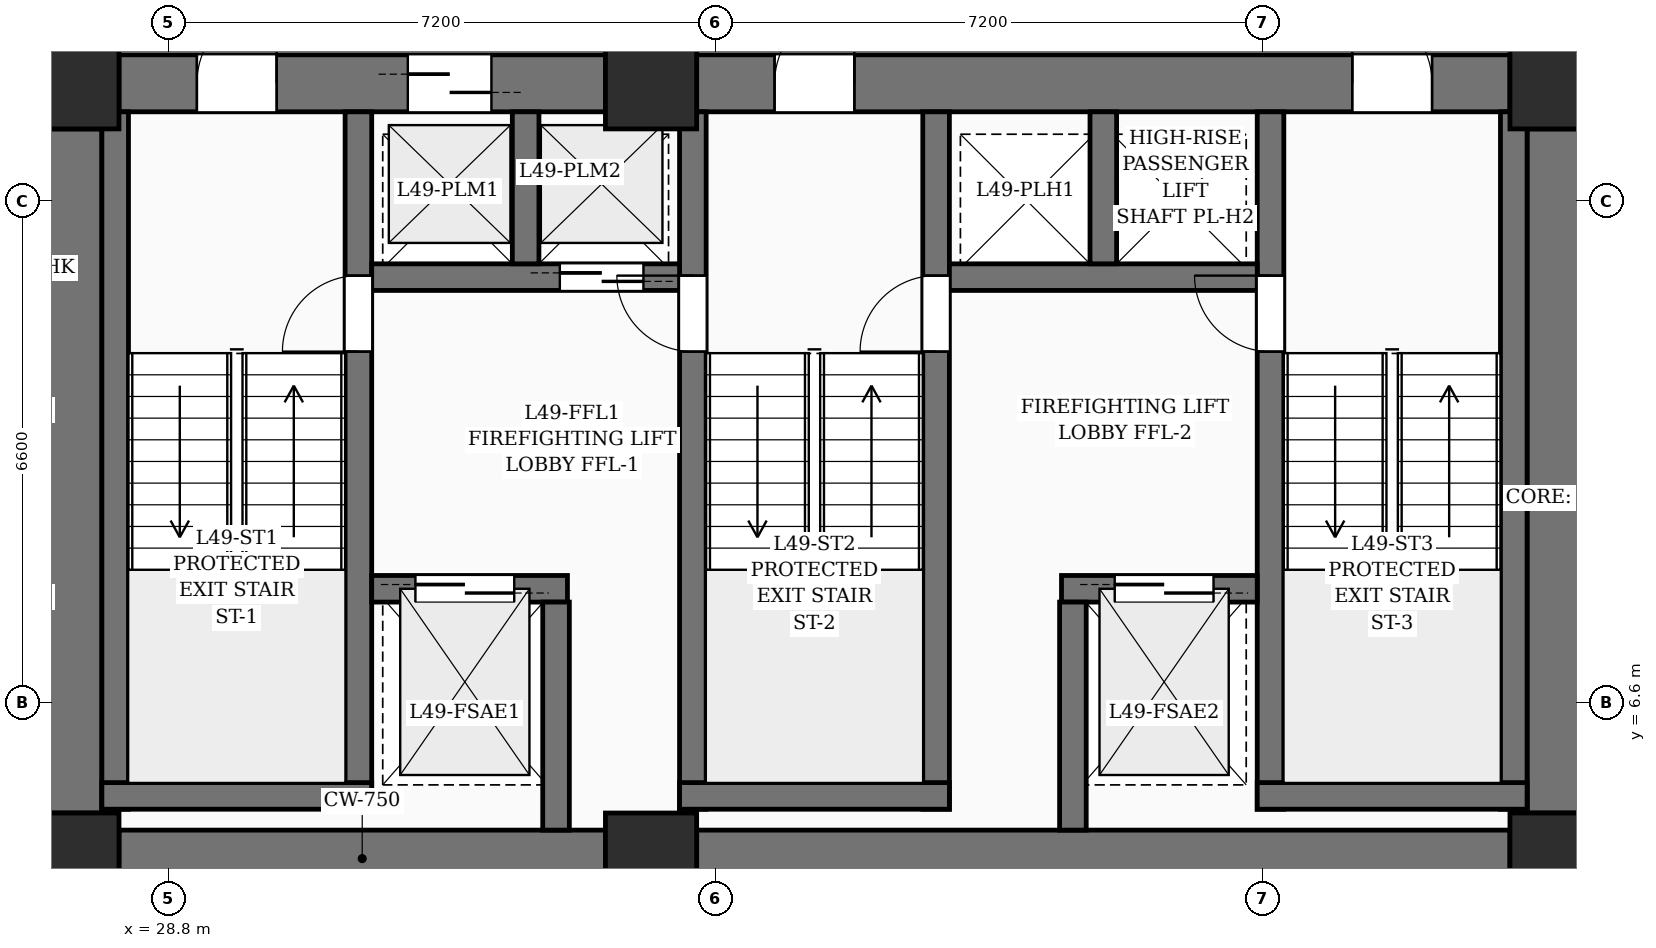
"""IFC4 building model, lengths in metres.
Left out: names, types, materials, properties, quantities, classifications, styles, units other than length and angle.
Written with IfcOpenShell. Run it as: python <this file> out.ifc"""

import sys

from ifc_helpers import new_model, si_unit, direction, frame, frame_2d, origin, origin_2d, place, context, subcontext, project, spatial, rectangle, extrude, element, fill, save


model = new_model("IFC4")
c1 = context("Model", 3, precision=1e-05, world=origin(), true_north=direction((0.0, 1.0)))
c2 = subcontext(c1, "Body", "Model", "MODEL_VIEW")
j1 = project(units=[si_unit("LENGTHUNIT", "METRE"), si_unit("PLANEANGLEUNIT", "RADIAN")], contexts=[c1])
p1 = place(None, origin())
s1 = spatial("IfcSite", under=j1, at=p1, CompositionType="ELEMENT")
p2 = place(p1, origin())
s2 = spatial("IfcBuilding", under=s1, at=p2, CompositionType="ELEMENT")
p3 = place(p2, frame((0.0, 0.0, 189.6)))
s3 = spatial("IfcBuildingStorey", under=s2, at=p3, CompositionType="ELEMENT", Elevation=189.6)
for number, where, z_axis, x_axis in (
    (1, (27.55, 4.55, 0.0), (0.0, 0.0, 1.0), (1.0, 0.0, 0.0)),
    (2, (35.15, 4.55, 0.0), (0.0, 0.0, 1.0), (1.0, 0.0, 0.0)),
    (3, (47.05, 4.55, 0.0), (0.0, 0.0, 1.0), (1.0, 0.0, 0.0)),
    (4, (27.55, 14.75, 0.0), (0.0, 0.0, 1.0), (1.0, 0.0, 0.0)),
    (5, (35.15, 14.75, 0.0), (0.0, 0.0, 1.0), (1.0, 0.0, 0.0)),
    (6, (47.05, 14.75, 0.0), (0.0, 0.0, 1.0), (1.0, 0.0, 0.0)),
):
    element("IfcColumn", number, at=place(p3, frame(where, z_axis=z_axis, x_axis=x_axis)), inside=s3, PredefinedType="COLUMN", context=c2, shape_type="SweptSolid", body=[
        extrude(rectangle(XDim=1.2, YDim=1.2, at=origin_2d()), origin(), (0.0, 0.0, 1.0), 3.6),
    ])
p4 = place(p3, frame((28.15, 4.55, 0.0), z_axis=(0.0, 0.0, 1.0), x_axis=(1.0, 0.0, 0.0)))
e7 = element("IfcWall", 7, at=p4, inside=s3, PredefinedType="SHEAR", context=c2, shape_type="SweptSolid", body=[
    extrude(rectangle(XDim=6.4, YDim=0.75, at=frame_2d((3.2, 0.0))), origin(), (0.0, 0.0, 1.0), 3.6),
])
p5 = place(p3, frame((35.75, 4.55, 0.0), z_axis=(0.0, 0.0, 1.0), x_axis=(1.0, 0.0, 0.0)))
e8 = element("IfcWall", 8, at=p5, inside=s3, PredefinedType="SHEAR", context=c2, shape_type="SweptSolid", body=[
    extrude(rectangle(XDim=10.7, YDim=0.75, at=frame_2d((5.35, 0.0))), origin(), (0.0, 0.0, 1.0), 3.6),
])
p6 = place(p3, frame((28.15, 14.75, 0.0), z_axis=(0.0, 0.0, 1.0), x_axis=(1.0, 0.0, 0.0)))
e9 = element("IfcWall", 9, at=p6, inside=s3, PredefinedType="SHEAR", context=c2, shape_type="SweptSolid", body=[
    extrude(rectangle(XDim=6.4, YDim=0.75, at=frame_2d((3.2, 0.0))), origin(), (0.0, 0.0, 1.0), 3.6),
])
p7 = place(p6, frame((1.025, 0.0, 0.0)))
e10 = element("IfcOpeningElement", 10, at=p7, cuts=e9, PredefinedType="OPENING", context=c2, shape_type="SweptSolid", body=[
    extrude(rectangle(XDim=1.05, YDim=2.15, at=frame_2d((0.525, 1.075))), frame((0.0, 0.385, 0.0), z_axis=(0.0, -1.0, 0.0), x_axis=(1.0, 0.0, 0.0)), (0.0, 0.0, 1.0), 0.77),
])
p8 = place(p6, frame((3.8, 0.0, 0.0)))
e11 = element("IfcOpeningElement", 11, at=p8, cuts=e9, PredefinedType="OPENING", context=c2, shape_type="SweptSolid", body=[
    extrude(rectangle(XDim=1.1, YDim=2.2, at=frame_2d((0.55, 1.1))), frame((0.0, 0.385, 0.0), z_axis=(0.0, -1.0, 0.0), x_axis=(1.0, 0.0, 0.0)), (0.0, 0.0, 1.0), 0.77),
])
p9 = place(p3, frame((35.75, 14.75, 0.0), z_axis=(0.0, 0.0, 1.0), x_axis=(1.0, 0.0, 0.0)))
e12 = element("IfcWall", 12, at=p9, inside=s3, PredefinedType="SHEAR", context=c2, shape_type="SweptSolid", body=[
    extrude(rectangle(XDim=10.7, YDim=0.75, at=frame_2d((5.35, 0.0))), origin(), (0.0, 0.0, 1.0), 3.6),
])
p10 = place(p9, frame((1.025, 0.0, 0.0)))
e13 = element("IfcOpeningElement", 13, at=p10, cuts=e12, PredefinedType="OPENING", context=c2, shape_type="SweptSolid", body=[
    extrude(rectangle(XDim=1.05, YDim=2.15, at=frame_2d((0.525, 1.075))), frame((0.0, 0.385, 0.0), z_axis=(0.0, -1.0, 0.0), x_axis=(1.0, 0.0, 0.0)), (0.0, 0.0, 1.0), 0.77),
])
p11 = place(p9, frame((8.625, 0.0, 0.0)))
e14 = element("IfcOpeningElement", 14, at=p11, cuts=e12, PredefinedType="OPENING", context=c2, shape_type="SweptSolid", body=[
    extrude(rectangle(XDim=1.05, YDim=2.15, at=frame_2d((0.525, 1.075))), frame((0.0, 0.385, 0.0), z_axis=(0.0, -1.0, 0.0), x_axis=(1.0, 0.0, 0.0)), (0.0, 0.0, 1.0), 0.77),
])
for number, where, z_axis, x_axis in (
    (15, (27.55, 5.15, 0.0), (0.0, 0.0, 1.0), (0.0, 1.0, 0.0)),
    (16, (47.05, 5.15, 0.0), (0.0, 0.0, 1.0), (0.0, 1.0, 0.0)),
):
    element("IfcWall", number, at=place(p3, frame(where, z_axis=z_axis, x_axis=x_axis)), inside=s3, PredefinedType="SHEAR", context=c2, shape_type="SweptSolid", body=[
        extrude(rectangle(XDim=9.0, YDim=0.75, at=frame_2d((4.5, 0.0))), origin(), (0.0, 0.0, 1.0), 3.6),
    ])
p12 = place(p3, frame((28.1, 5.2, 0.0), z_axis=(0.0, 0.0, 1.0), x_axis=(0.0, 1.0, 0.0)))
e17 = element("IfcWall", 17, at=p12, inside=s3, PredefinedType="SOLIDWALL", context=c2, shape_type="SweptSolid", body=[
    extrude(rectangle(XDim=9.175, YDim=0.35, at=frame_2d((4.587, 0.0))), origin(), (0.0, 0.0, 1.0), 3.6),
])
p13 = place(p3, frame((31.3, 5.2, 0.0), z_axis=(0.0, 0.0, 1.0), x_axis=(0.0, 1.0, 0.0)))
e18 = element("IfcWall", 18, at=p13, inside=s3, PredefinedType="SOLIDWALL", context=c2, shape_type="SweptSolid", body=[
    extrude(rectangle(XDim=9.175, YDim=0.35, at=frame_2d((4.587, 0.0))), origin(), (0.0, 0.0, 1.0), 3.6),
])
p14 = place(p13, frame((6.02, 0.0, 0.0)))
e19 = element("IfcOpeningElement", 19, at=p14, cuts=e18, PredefinedType="OPENING", context=c2, shape_type="SweptSolid", body=[
    extrude(rectangle(XDim=1.0, YDim=2.15, at=frame_2d((0.5, 1.075))), frame((0.0, 0.185, 0.0), z_axis=(0.0, -1.0, 0.0), x_axis=(1.0, 0.0, 0.0)), (0.0, 0.0, 1.0), 0.37),
])
p15 = place(p3, frame((27.925, 5.375, 0.0), z_axis=(0.0, 0.0, 1.0), x_axis=(1.0, 0.0, 0.0)))
e20 = element("IfcWall", 20, at=p15, inside=s3, PredefinedType="SOLIDWALL", context=c2, shape_type="SweptSolid", body=[
    extrude(rectangle(XDim=3.55, YDim=0.35, at=frame_2d((1.775, 0.0))), origin(), (0.0, 0.0, 1.0), 3.6),
])
p16 = place(p3, frame((35.7, 5.2, 0.0), z_axis=(0.0, 0.0, 1.0), x_axis=(0.0, 1.0, 0.0)))
e21 = element("IfcWall", 21, at=p16, inside=s3, PredefinedType="SOLIDWALL", context=c2, shape_type="SweptSolid", body=[
    extrude(rectangle(XDim=9.175, YDim=0.35, at=frame_2d((4.587, 0.0))), origin(), (0.0, 0.0, 1.0), 3.6),
])
p17 = place(p16, frame((6.02, 0.0, 0.0)))
e22 = element("IfcOpeningElement", 22, at=p17, cuts=e21, PredefinedType="OPENING", context=c2, shape_type="SweptSolid", body=[
    extrude(rectangle(XDim=1.0, YDim=2.15, at=frame_2d((0.5, 1.075))), frame((0.0, 0.185, 0.0), z_axis=(0.0, -1.0, 0.0), x_axis=(1.0, 0.0, 0.0)), (0.0, 0.0, 1.0), 0.37),
])
p18 = place(p3, frame((38.9, 5.2, 0.0), z_axis=(0.0, 0.0, 1.0), x_axis=(0.0, 1.0, 0.0)))
e23 = element("IfcWall", 23, at=p18, inside=s3, PredefinedType="SOLIDWALL", context=c2, shape_type="SweptSolid", body=[
    extrude(rectangle(XDim=9.175, YDim=0.35, at=frame_2d((4.587, 0.0))), origin(), (0.0, 0.0, 1.0), 3.6),
])
p19 = place(p18, frame((6.02, 0.0, 0.0)))
e24 = element("IfcOpeningElement", 24, at=p19, cuts=e23, PredefinedType="OPENING", context=c2, shape_type="SweptSolid", body=[
    extrude(rectangle(XDim=1.0, YDim=2.15, at=frame_2d((0.5, 1.075))), frame((0.0, 0.185, 0.0), z_axis=(0.0, -1.0, 0.0), x_axis=(1.0, 0.0, 0.0)), (0.0, 0.0, 1.0), 0.37),
])
p20 = place(p3, frame((35.525, 5.375, 0.0), z_axis=(0.0, 0.0, 1.0), x_axis=(1.0, 0.0, 0.0)))
e25 = element("IfcWall", 25, at=p20, inside=s3, PredefinedType="SOLIDWALL", context=c2, shape_type="SweptSolid", body=[
    extrude(rectangle(XDim=3.55, YDim=0.35, at=frame_2d((1.775, 0.0))), origin(), (0.0, 0.0, 1.0), 3.6),
])
p21 = place(p3, frame((43.3, 5.2, 0.0), z_axis=(0.0, 0.0, 1.0), x_axis=(0.0, 1.0, 0.0)))
e26 = element("IfcWall", 26, at=p21, inside=s3, PredefinedType="SOLIDWALL", context=c2, shape_type="SweptSolid", body=[
    extrude(rectangle(XDim=9.175, YDim=0.35, at=frame_2d((4.587, 0.0))), origin(), (0.0, 0.0, 1.0), 3.6),
])
p22 = place(p21, frame((6.02, 0.0, 0.0)))
e27 = element("IfcOpeningElement", 27, at=p22, cuts=e26, PredefinedType="OPENING", context=c2, shape_type="SweptSolid", body=[
    extrude(rectangle(XDim=1.0, YDim=2.15, at=frame_2d((0.5, 1.075))), frame((0.0, 0.185, 0.0), z_axis=(0.0, -1.0, 0.0), x_axis=(1.0, 0.0, 0.0)), (0.0, 0.0, 1.0), 0.37),
])
p23 = place(p3, frame((46.5, 5.2, 0.0), z_axis=(0.0, 0.0, 1.0), x_axis=(0.0, 1.0, 0.0)))
e28 = element("IfcWall", 28, at=p23, inside=s3, PredefinedType="SOLIDWALL", context=c2, shape_type="SweptSolid", body=[
    extrude(rectangle(XDim=9.175, YDim=0.35, at=frame_2d((4.587, 0.0))), origin(), (0.0, 0.0, 1.0), 3.6),
])
p24 = place(p3, frame((43.125, 5.375, 0.0), z_axis=(0.0, 0.0, 1.0), x_axis=(1.0, 0.0, 0.0)))
e29 = element("IfcWall", 29, at=p24, inside=s3, PredefinedType="SOLIDWALL", context=c2, shape_type="SweptSolid", body=[
    extrude(rectangle(XDim=3.55, YDim=0.35, at=frame_2d((1.775, 0.0))), origin(), (0.0, 0.0, 1.0), 3.6),
])
p25 = place(p3, frame((31.475, 8.1, 0.0), z_axis=(0.0, 0.0, 1.0), x_axis=(1.0, 0.0, 0.0)))
e30 = element("IfcWall", 30, at=p25, inside=s3, PredefinedType="SOLIDWALL", context=c2, shape_type="SweptSolid", body=[
    extrude(rectangle(XDim=2.575, YDim=0.35, at=frame_2d((1.288, 0.0))), origin(), (0.0, 0.0, 1.0), 3.6),
])
p26 = place(p25, frame((0.575, 0.0, 0.0)))
e31 = element("IfcOpeningElement", 31, at=p26, cuts=e30, PredefinedType="OPENING", context=c2, shape_type="SweptSolid", body=[
    extrude(rectangle(XDim=1.3, YDim=2.25, at=frame_2d((0.65, 1.125))), frame((0.0, 0.185, 0.0), z_axis=(0.0, -1.0, 0.0), x_axis=(1.0, 0.0, 0.0)), (0.0, 0.0, 1.0), 0.37),
])
p27 = place(p3, frame((40.55, 8.1, 0.0), z_axis=(0.0, 0.0, 1.0), x_axis=(1.0, 0.0, 0.0)))
e32 = element("IfcWall", 32, at=p27, inside=s3, PredefinedType="SOLIDWALL", context=c2, shape_type="SweptSolid", body=[
    extrude(rectangle(XDim=2.575, YDim=0.35, at=frame_2d((1.288, 0.0))), origin(), (0.0, 0.0, 1.0), 3.6),
])
p28 = place(p27, frame((0.7, 0.0, 0.0)))
e33 = element("IfcOpeningElement", 33, at=p28, cuts=e32, PredefinedType="OPENING", context=c2, shape_type="SweptSolid", body=[
    extrude(rectangle(XDim=1.3, YDim=2.25, at=frame_2d((0.65, 1.125))), frame((0.0, 0.185, 0.0), z_axis=(0.0, -1.0, 0.0), x_axis=(1.0, 0.0, 0.0)), (0.0, 0.0, 1.0), 0.37),
])
for number, where, z_axis, x_axis in (
    (34, (33.9, 4.925, 0.0), (0.0, 0.0, 1.0), (0.0, 1.0, 0.0)),
    (35, (40.7, 4.925, 0.0), (0.0, 0.0, 1.0), (0.0, 1.0, 0.0)),
):
    element("IfcWall", number, at=place(p3, frame(where, z_axis=z_axis, x_axis=x_axis)), inside=s3, PredefinedType="SOLIDWALL", context=c2, shape_type="SweptSolid", body=[
        extrude(rectangle(XDim=3.0, YDim=0.35, at=frame_2d((1.5, 0.0))), origin(), (0.0, 0.0, 1.0), 3.6),
    ])
p29 = place(p3, frame((31.475, 12.2, 0.0), z_axis=(0.0, 0.0, 1.0), x_axis=(1.0, 0.0, 0.0)))
e36 = element("IfcWall", 36, at=p29, inside=s3, PredefinedType="SOLIDWALL", context=c2, shape_type="SweptSolid", body=[
    extrude(rectangle(XDim=4.05, YDim=0.35, at=frame_2d((2.025, 0.0))), origin(), (0.0, 0.0, 1.0), 3.6),
])
p30 = place(p29, frame((2.475, 0.0, 0.0)))
e37 = element("IfcOpeningElement", 37, at=p30, cuts=e36, PredefinedType="OPENING", context=c2, shape_type="SweptSolid", body=[
    extrude(rectangle(XDim=1.1, YDim=2.2, at=frame_2d((0.55, 1.1))), frame((0.0, 0.185, 0.0), z_axis=(0.0, -1.0, 0.0), x_axis=(1.0, 0.0, 0.0)), (0.0, 0.0, 1.0), 0.37),
])
p31 = place(p3, frame((33.5, 12.375, 0.0), z_axis=(0.0, 0.0, 1.0), x_axis=(0.0, 1.0, 0.0)))
e38 = element("IfcWall", 38, at=p31, inside=s3, PredefinedType="SOLIDWALL", context=c2, shape_type="SweptSolid", body=[
    extrude(rectangle(XDim=2.0, YDim=0.35, at=frame_2d((1.0, 0.0))), origin(), (0.0, 0.0, 1.0), 3.6),
])
p32 = place(p3, frame((39.075, 12.2, 0.0), z_axis=(0.0, 0.0, 1.0), x_axis=(1.0, 0.0, 0.0)))
e39 = element("IfcWall", 39, at=p32, inside=s3, PredefinedType="SOLIDWALL", context=c2, shape_type="SweptSolid", body=[
    extrude(rectangle(XDim=4.05, YDim=0.35, at=frame_2d((2.025, 0.0))), origin(), (0.0, 0.0, 1.0), 3.6),
])
p33 = place(p3, frame((41.1, 12.375, 0.0), z_axis=(0.0, 0.0, 1.0), x_axis=(0.0, 1.0, 0.0)))
e40 = element("IfcWall", 40, at=p33, inside=s3, PredefinedType="SOLIDWALL", context=c2, shape_type="SweptSolid", body=[
    extrude(rectangle(XDim=2.0, YDim=0.35, at=frame_2d((1.0, 0.0))), origin(), (0.0, 0.0, 1.0), 3.6),
])
p34 = place(p7, origin())
e41 = element("IfcDoor", 41, at=p34, inside=s3, OperationType="SINGLE_SWING_RIGHT", PredefinedType="DOOR", context=c2, shape_type="SweptSolid", body=[
    extrude(rectangle(XDim=1.05, YDim=2.15, at=frame_2d((0.525, 1.075))), frame((0.0, 0.025, 0.0), z_axis=(0.0, -1.0, 0.0), x_axis=(1.0, 0.0, 0.0)), (0.0, 0.0, 1.0), 0.05),
])
fill(e10, e41)
p35 = place(p10, origin())
e42 = element("IfcDoor", 42, at=p35, inside=s3, OperationType="SINGLE_SWING_RIGHT", PredefinedType="DOOR", context=c2, shape_type="SweptSolid", body=[
    extrude(rectangle(XDim=1.05, YDim=2.15, at=frame_2d((0.525, 1.075))), frame((0.0, 0.025, 0.0), z_axis=(0.0, -1.0, 0.0), x_axis=(1.0, 0.0, 0.0)), (0.0, 0.0, 1.0), 0.05),
])
fill(e13, e42)
p36 = place(p11, origin())
e43 = element("IfcDoor", 43, at=p36, inside=s3, OperationType="SINGLE_SWING_LEFT", PredefinedType="DOOR", context=c2, shape_type="SweptSolid", body=[
    extrude(rectangle(XDim=1.05, YDim=2.15, at=frame_2d((0.525, 1.075))), frame((0.0, 0.025, 0.0), z_axis=(0.0, -1.0, 0.0), x_axis=(1.0, 0.0, 0.0)), (0.0, 0.0, 1.0), 0.05),
])
fill(e14, e43)
p37 = place(p14, origin())
e44 = element("IfcDoor", 44, at=p37, inside=s3, OperationType="SINGLE_SWING_LEFT", PredefinedType="DOOR", context=c2, shape_type="SweptSolid", body=[
    extrude(rectangle(XDim=1.0, YDim=2.15, at=frame_2d((0.5, 1.075))), frame((0.0, 0.025, 0.0), z_axis=(0.0, -1.0, 0.0), x_axis=(1.0, 0.0, 0.0)), (0.0, 0.0, 1.0), 0.05),
])
fill(e19, e44)
p38 = place(p17, origin())
e45 = element("IfcDoor", 45, at=p38, inside=s3, OperationType="SINGLE_SWING_RIGHT", PredefinedType="DOOR", context=c2, shape_type="SweptSolid", body=[
    extrude(rectangle(XDim=1.0, YDim=2.15, at=frame_2d((0.5, 1.075))), frame((0.0, 0.025, 0.0), z_axis=(0.0, -1.0, 0.0), x_axis=(1.0, 0.0, 0.0)), (0.0, 0.0, 1.0), 0.05),
])
fill(e22, e45)
p39 = place(p19, origin())
e46 = element("IfcDoor", 46, at=p39, inside=s3, OperationType="SINGLE_SWING_LEFT", PredefinedType="DOOR", context=c2, shape_type="SweptSolid", body=[
    extrude(rectangle(XDim=1.0, YDim=2.15, at=frame_2d((0.5, 1.075))), frame((0.0, 0.025, 0.0), z_axis=(0.0, -1.0, 0.0), x_axis=(1.0, 0.0, 0.0)), (0.0, 0.0, 1.0), 0.05),
])
fill(e24, e46)
p40 = place(p22, origin())
e47 = element("IfcDoor", 47, at=p40, inside=s3, OperationType="SINGLE_SWING_RIGHT", PredefinedType="DOOR", context=c2, shape_type="SweptSolid", body=[
    extrude(rectangle(XDim=1.0, YDim=2.15, at=frame_2d((0.5, 1.075))), frame((0.0, 0.025, 0.0), z_axis=(0.0, -1.0, 0.0), x_axis=(1.0, 0.0, 0.0)), (0.0, 0.0, 1.0), 0.05),
])
fill(e27, e47)
p41 = place(p26, origin())
e48 = element("IfcDoor", 48, at=p41, inside=s3, OperationType="DOUBLE_DOOR_SLIDING", PredefinedType="DOOR", context=c2, shape_type="SweptSolid", body=[
    extrude(rectangle(XDim=1.3, YDim=2.25, at=frame_2d((0.65, 1.125))), frame((0.0, 0.025, 0.0), z_axis=(0.0, -1.0, 0.0), x_axis=(1.0, 0.0, 0.0)), (0.0, 0.0, 1.0), 0.05),
])
fill(e31, e48)
p42 = place(p28, origin())
e49 = element("IfcDoor", 49, at=p42, inside=s3, OperationType="DOUBLE_DOOR_SLIDING", PredefinedType="DOOR", context=c2, shape_type="SweptSolid", body=[
    extrude(rectangle(XDim=1.3, YDim=2.25, at=frame_2d((0.65, 1.125))), frame((0.0, 0.025, 0.0), z_axis=(0.0, -1.0, 0.0), x_axis=(1.0, 0.0, 0.0)), (0.0, 0.0, 1.0), 0.05),
])
fill(e33, e49)
p43 = place(p8, origin())
e50 = element("IfcDoor", 50, at=p43, inside=s3, OperationType="DOUBLE_DOOR_SLIDING", PredefinedType="DOOR", context=c2, shape_type="SweptSolid", body=[
    extrude(rectangle(XDim=1.1, YDim=2.2, at=frame_2d((0.55, 1.1))), frame((0.0, 0.025, 0.0), z_axis=(0.0, -1.0, 0.0), x_axis=(1.0, 0.0, 0.0)), (0.0, 0.0, 1.0), 0.05),
])
fill(e11, e50)
p44 = place(p30, origin())
e51 = element("IfcDoor", 51, at=p44, inside=s3, OperationType="DOUBLE_DOOR_SLIDING", PredefinedType="DOOR", context=c2, shape_type="SweptSolid", body=[
    extrude(rectangle(XDim=1.1, YDim=2.2, at=frame_2d((0.55, 1.1))), frame((0.0, 0.025, 0.0), z_axis=(0.0, -1.0, 0.0), x_axis=(1.0, 0.0, 0.0)), (0.0, 0.0, 1.0), 0.05),
])
fill(e37, e51)
save(model, sys.argv[1])
